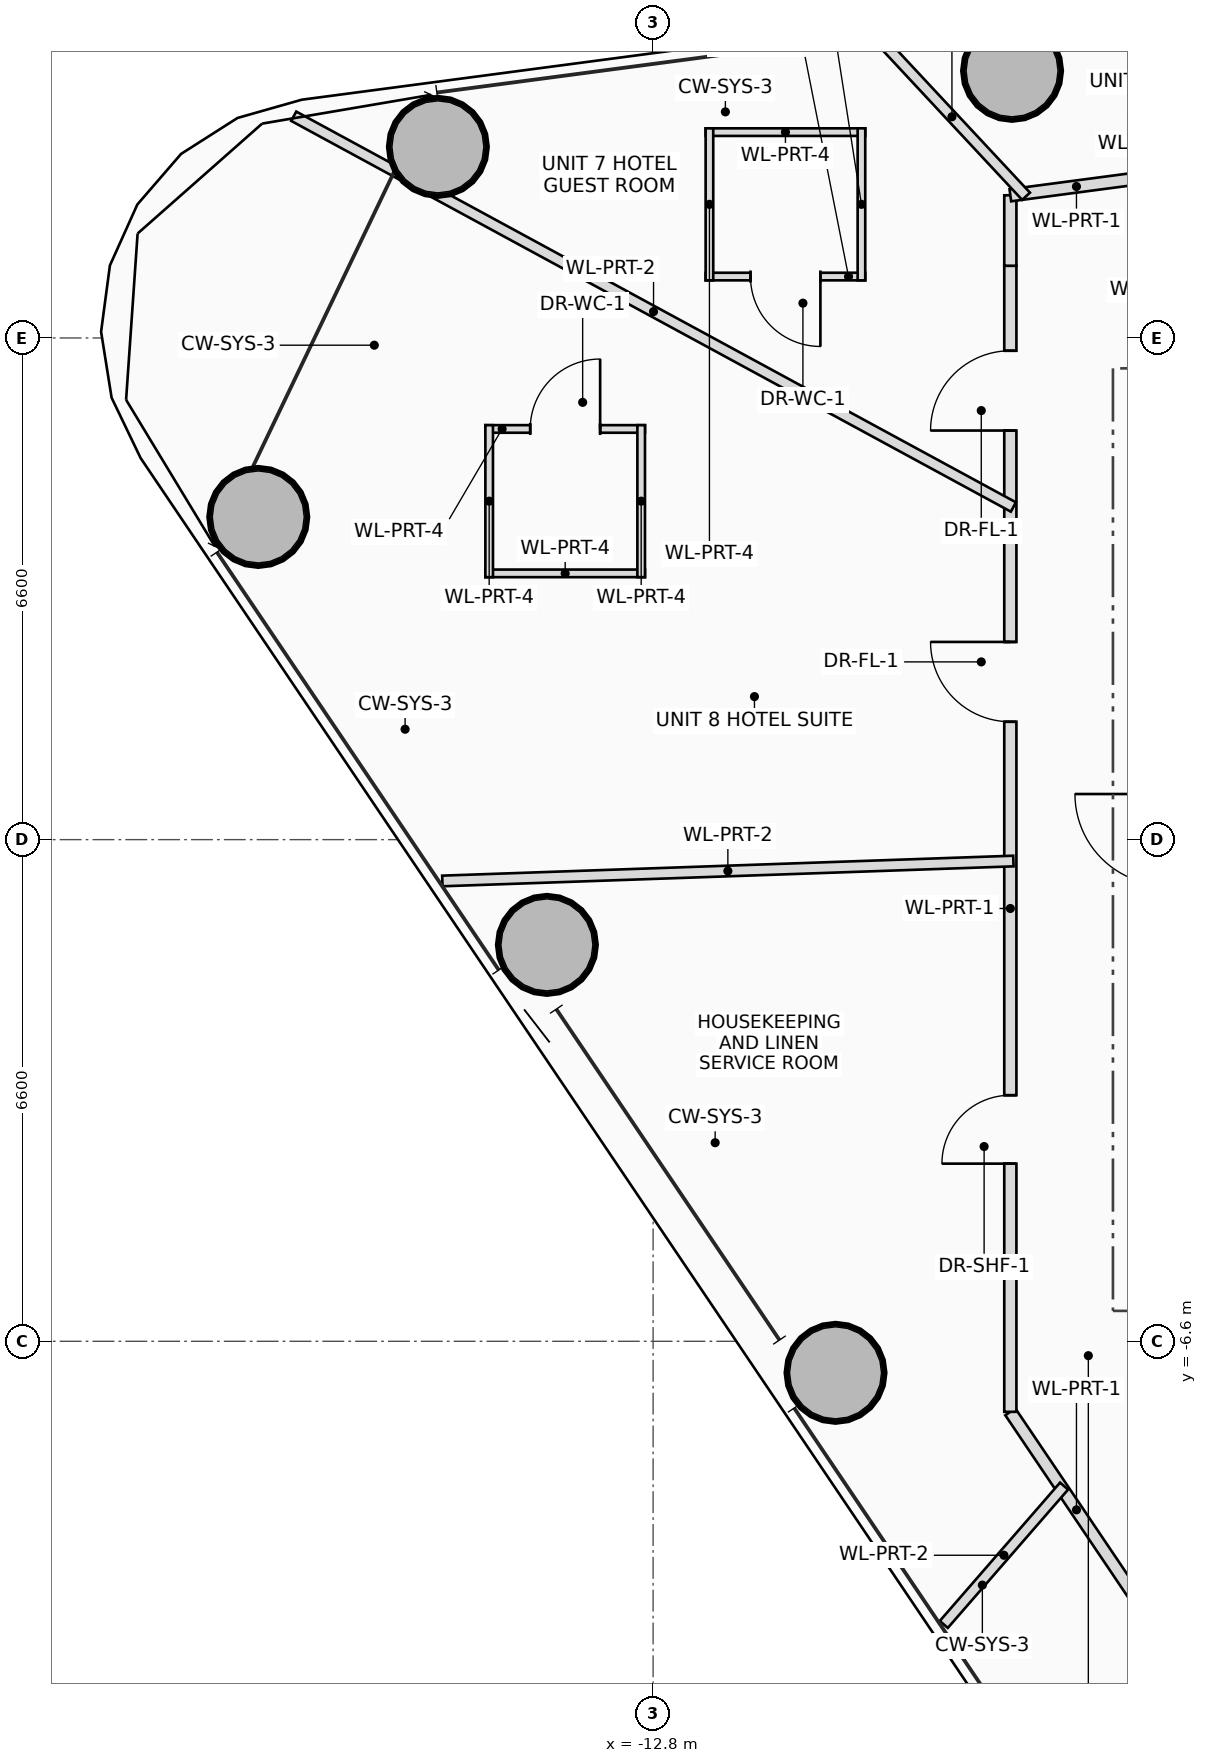
"""IFC4 building model, lengths in metres.
Left out: names, types, materials, properties, quantities, classifications, styles, units other than length and angle.
Written with IfcOpenShell. Run it as: python <this file> out.ifc"""

import sys

from ifc_helpers import new_model, si_unit, direction, frame, frame_2d, origin, origin_2d, place, context, subcontext, project, spatial, rectangle, hollow_circle, extrude, source, transform, mapped, element, fill, save


model = new_model("IFC4")
c1 = context("Model", 3, precision=1e-05, world=origin(), true_north=direction((0.0, 1.0)))
c2 = subcontext(c1, "Body", "Model", "MODEL_VIEW")
j1 = project(units=[si_unit("LENGTHUNIT", "METRE"), si_unit("PLANEANGLEUNIT", "RADIAN")], contexts=[c1])
p1 = place(None, origin())
s1 = spatial("IfcSite", under=j1, at=p1, CompositionType="ELEMENT")
p2 = place(p1, origin())
s2 = spatial("IfcBuilding", under=s1, at=p2, CompositionType="ELEMENT")
p3 = place(p2, frame((0.0, 0.0, 172.55)))
s3 = spatial("IfcBuildingStorey", under=s2, at=p3, CompositionType="ELEMENT", Elevation=172.55)
m1 = source(origin(), c2, "Body", "SweptSolid", [
    extrude(hollow_circle(Radius=0.65, WallThickness=0.045, at=origin_2d()), origin(), (0.0, 0.0, 1.0), 3.45),
])
for number, where, z_axis, x_axis in (
    (1, (-8.077, 10.114, 0.0), (0.0, 0.0, 1.0), (1.0, 0.0, 0.0)),
    (2, (-15.632, 9.114, 0.0), (0.0, 0.0, 1.0), (1.0, 0.0, 0.0)),
    (3, (-17.995, 4.245, 0.0), (0.0, 0.0, 1.0), (1.0, 0.0, 0.0)),
    (4, (-14.198, -1.385, 0.0), (0.0, 0.0, 1.0), (1.0, 0.0, 0.0)),
    (5, (-10.4, -7.015, 0.0), (0.0, 0.0, 1.0), (1.0, 0.0, 0.0)),
):
    element("IfcColumn", number, at=place(p3, frame(where, z_axis=z_axis, x_axis=x_axis)), inside=s3, PredefinedType="COLUMN", context=c2, shape_type="MappedRepresentation", body=[
        mapped(m1, transform((0.0, 0.0, 0.0), scale=1.0)),
    ])
p4 = place(p3, frame((-12.109, 9.308, 0.0), z_axis=(0.0, 0.0, 1.0), x_axis=(1.0, 0.0, 0.0)))
e6 = element("IfcWall", 6, at=p4, inside=s3, PredefinedType="PARTITIONING", context=c2, shape_type="SweptSolid", body=[
    extrude(rectangle(XDim=2.1, YDim=0.1, at=frame_2d((1.05, 0.0))), origin(), (0.0, 0.0, 1.0), 3.25),
])
p5 = place(p3, frame((-10.009, 7.408, 0.0), z_axis=(0.0, 0.0, 1.0), x_axis=(-1.0, 0.0, 0.0)))
e7 = element("IfcWall", 7, at=p5, inside=s3, PredefinedType="PARTITIONING", context=c2, shape_type="SweptSolid", body=[
    extrude(rectangle(XDim=2.1, YDim=0.1, at=frame_2d((1.05, 0.0))), origin(), (0.0, 0.0, 1.0), 2.605),
])
p6 = place(p5, frame((0.59, 0.0, 0.0)))
e8 = element("IfcOpeningElement", 8, at=p6, cuts=e7, PredefinedType="OPENING", context=c2, shape_type="SweptSolid", body=[
    extrude(rectangle(XDim=0.92, YDim=2.1, at=frame_2d((0.46, 1.05))), frame((0.0, 0.06, 0.0), z_axis=(0.0, -1.0, 0.0), x_axis=(1.0, 0.0, 0.0)), (0.0, 0.0, 1.0), 0.12),
])
p7 = place(p3, frame((-10.059, 9.358, 0.0), z_axis=(0.0, 0.0, 1.0), x_axis=(0.0, -1.0, 0.0)))
e9 = element("IfcWall", 9, at=p7, inside=s3, PredefinedType="PARTITIONING", context=c2, shape_type="SweptSolid", body=[
    extrude(rectangle(XDim=2.0, YDim=0.1, at=frame_2d((1.0, 0.0))), origin(), (0.0, 0.0, 1.0), 2.805),
])
p8 = place(p3, frame((-12.059, 7.358, 0.0), z_axis=(0.0, 0.0, 1.0), x_axis=(0.0, 1.0, 0.0)))
e10 = element("IfcWall", 10, at=p8, inside=s3, PredefinedType="PARTITIONING", context=c2, shape_type="SweptSolid", body=[
    extrude(rectangle(XDim=2.0, YDim=0.1, at=frame_2d((1.0, 0.0))), origin(), (0.0, 0.0, 1.0), 2.605),
])
p9 = place(p3, frame((-15.007, 5.403, 0.0), z_axis=(0.0, 0.0, 1.0), x_axis=(1.0, 0.0, 0.0)))
e11 = element("IfcWall", 11, at=p9, inside=s3, PredefinedType="PARTITIONING", context=c2, shape_type="SweptSolid", body=[
    extrude(rectangle(XDim=2.1, YDim=0.1, at=frame_2d((1.05, 0.0))), origin(), (0.0, 0.0, 1.0), 2.905),
])
p10 = place(p9, frame((0.59, 0.0, 0.0)))
e12 = element("IfcOpeningElement", 12, at=p10, cuts=e11, PredefinedType="OPENING", context=c2, shape_type="SweptSolid", body=[
    extrude(rectangle(XDim=0.92, YDim=2.1, at=frame_2d((0.46, 1.05))), frame((0.0, 0.06, 0.0), z_axis=(0.0, -1.0, 0.0), x_axis=(1.0, 0.0, 0.0)), (0.0, 0.0, 1.0), 0.12),
])
p11 = place(p3, frame((-12.907, 3.503, 0.0), z_axis=(0.0, 0.0, 1.0), x_axis=(-1.0, 0.0, 0.0)))
e13 = element("IfcWall", 13, at=p11, inside=s3, PredefinedType="PARTITIONING", context=c2, shape_type="SweptSolid", body=[
    extrude(rectangle(XDim=2.1, YDim=0.1, at=frame_2d((1.05, 0.0))), origin(), (0.0, 0.0, 1.0), 2.905),
])
for number, where, z_axis, x_axis in (
    (14, (-12.957, 5.453, 0.0), (0.0, 0.0, 1.0), (0.0, -1.0, 0.0)),
    (15, (-14.957, 3.453, 0.0), (0.0, 0.0, 1.0), (0.0, 1.0, 0.0)),
):
    element("IfcWall", number, at=place(p3, frame(where, z_axis=z_axis, x_axis=x_axis)), inside=s3, PredefinedType="PARTITIONING", context=c2, shape_type="SweptSolid", body=[
        extrude(rectangle(XDim=2.0, YDim=0.1, at=frame_2d((1.0, 0.0))), origin(), (0.0, 0.0, 1.0), 2.605),
    ])
p12 = place(p3, frame((-6.36, -10.107, 0.0), z_axis=(0.0, 0.0, 1.0), x_axis=(-0.559200615657, 0.829032370567, 0.0)))
e16 = element("IfcWall", 16, at=p12, inside=s3, PredefinedType="PARTITIONING", context=c2, shape_type="SweptSolid", body=[
    extrude(rectangle(XDim=3.112, YDim=0.16, at=frame_2d((1.556, 0.0))), origin(), (0.0, 0.0, 1.0), 2.605),
])
p13 = place(p3, frame((-8.1, -7.528, 0.0), z_axis=(0.0, 0.0, 1.0), x_axis=(0.0, 1.0, 0.0)))
e17 = element("IfcWall", 17, at=p13, inside=s3, PredefinedType="PARTITIONING", context=c2, shape_type="SweptSolid", body=[
    extrude(rectangle(XDim=15.078, YDim=0.16, at=frame_2d((7.539, 0.0))), origin(), (0.0, 0.0, 1.0), 2.605),
])
p14 = place(p13, frame((3.265, 0.0, 0.0)))
e18 = element("IfcOpeningElement", 18, at=p14, cuts=e17, PredefinedType="OPENING", context=c2, shape_type="SweptSolid", body=[
    extrude(rectangle(XDim=0.9, YDim=2.05, at=frame_2d((0.45, 1.025))), frame((0.0, 0.09, 0.0), z_axis=(0.0, -1.0, 0.0), x_axis=(1.0, 0.0, 0.0)), (0.0, 0.0, 1.0), 0.18),
])
p15 = place(p13, frame((9.079, 0.0, 0.0)))
e19 = element("IfcOpeningElement", 19, at=p15, cuts=e17, PredefinedType="OPENING", context=c2, shape_type="SweptSolid", body=[
    extrude(rectangle(XDim=1.05, YDim=2.2, at=frame_2d((0.525, 1.1))), frame((0.0, 0.09, 0.0), z_axis=(0.0, -1.0, 0.0), x_axis=(1.0, 0.0, 0.0)), (0.0, 0.0, 1.0), 0.18),
])
p16 = place(p13, frame((12.91, 0.0, 0.0)))
e20 = element("IfcOpeningElement", 20, at=p16, cuts=e17, PredefinedType="OPENING", context=c2, shape_type="SweptSolid", body=[
    extrude(rectangle(XDim=1.05, YDim=2.2, at=frame_2d((0.525, 1.1))), frame((0.0, 0.09, 0.0), z_axis=(0.0, -1.0, 0.0), x_axis=(1.0, 0.0, 0.0)), (0.0, 0.0, 1.0), 0.18),
])
p17 = place(p3, frame((-8.1, 7.55, 0.0), z_axis=(0.0, 0.0, 1.0), x_axis=(0.0, 1.0, 0.0)))
e21 = element("IfcWall", 21, at=p17, inside=s3, PredefinedType="PARTITIONING", context=c2, shape_type="SweptSolid", body=[
    extrude(rectangle(XDim=0.927, YDim=0.16, at=frame_2d((0.463, 0.0))), origin(), (0.0, 0.0, 1.0), 2.805),
])
p18 = place(p3, frame((-8.1, 8.477, 0.0), z_axis=(0.0, 0.0, 1.0), x_axis=(0.991341723558, 0.131307224223, 0.0)))
e22 = element("IfcWall", 22, at=p18, inside=s3, PredefinedType="PARTITIONING", context=c2, shape_type="SweptSolid", body=[
    extrude(rectangle(XDim=1.755, YDim=0.16, at=frame_2d((0.877, 0.0))), origin(), (0.0, 0.0, 1.0), 2.605),
])
p19 = place(p3, frame((-7.893, 8.464, 0.0), z_axis=(0.0, 0.0, 1.0), x_axis=(-0.682011061147, 0.73134185746, 0.0)))
e23 = element("IfcWall", 23, at=p19, inside=s3, PredefinedType="PARTITIONING", context=c2, shape_type="SweptSolid", body=[
    extrude(rectangle(XDim=2.861, YDim=0.14, at=frame_2d((1.43, 0.0))), origin(), (0.0, 0.0, 1.0), 2.765),
])
p20 = place(p3, frame((-8.06, 4.376, 0.0), z_axis=(0.0, 0.0, 1.0), x_axis=(-0.878817054271, 0.477158867802, 0.0)))
e24 = element("IfcWall", 24, at=p20, inside=s3, PredefinedType="PARTITIONING", context=c2, shape_type="SweptSolid", body=[
    extrude(rectangle(XDim=10.774, YDim=0.14, at=frame_2d((5.387, 0.0))), origin(), (0.0, 0.0, 1.0), 2.605),
])
p21 = place(p3, frame((-8.06, -0.281, 0.0), z_axis=(0.0, 0.0, 1.0), x_axis=(-0.999391525522, -0.034879488461, 0.0)))
e25 = element("IfcWall", 25, at=p21, inside=s3, PredefinedType="PARTITIONING", context=c2, shape_type="SweptSolid", body=[
    extrude(rectangle(XDim=7.518, YDim=0.14, at=frame_2d((3.759, 0.0))), origin(), (0.0, 0.0, 1.0), 2.765),
])
p22 = place(p3, frame((-7.393, -8.505, 0.0), z_axis=(0.0, 0.0, 1.0), x_axis=(-0.656043394523, -0.754723170774, 0.0)))
e26 = element("IfcWall", 26, at=p22, inside=s3, PredefinedType="PARTITIONING", context=c2, shape_type="SweptSolid", body=[
    extrude(rectangle(XDim=2.412, YDim=0.14, at=frame_2d((1.206, 0.0))), origin(), (0.0, 0.0, 1.0), 2.765),
])
p23 = place(p6, origin())
e27 = element("IfcDoor", 27, at=p23, inside=s3, OperationType="SINGLE_SWING_LEFT", PredefinedType="DOOR", context=c2, shape_type="SweptSolid", body=[
    extrude(rectangle(XDim=0.92, YDim=2.1, at=frame_2d((0.46, 1.05))), frame((0.0, 0.025, 0.0), z_axis=(0.0, -1.0, 0.0), x_axis=(1.0, 0.0, 0.0)), (0.0, 0.0, 1.0), 0.05),
])
fill(e8, e27)
p24 = place(p10, origin())
e28 = element("IfcDoor", 28, at=p24, inside=s3, OperationType="SINGLE_SWING_RIGHT", PredefinedType="DOOR", context=c2, shape_type="SweptSolid", body=[
    extrude(rectangle(XDim=0.92, YDim=2.1, at=frame_2d((0.46, 1.05))), frame((0.0, 0.025, 0.0), z_axis=(0.0, -1.0, 0.0), x_axis=(1.0, 0.0, 0.0)), (0.0, 0.0, 1.0), 0.05),
])
fill(e12, e28)
p25 = place(p14, origin())
e29 = element("IfcDoor", 29, at=p25, inside=s3, OperationType="SINGLE_SWING_LEFT", PredefinedType="DOOR", context=c2, shape_type="SweptSolid", body=[
    extrude(rectangle(XDim=0.9, YDim=2.05, at=frame_2d((0.45, 1.025))), frame((0.0, 0.025, 0.0), z_axis=(0.0, -1.0, 0.0), x_axis=(1.0, 0.0, 0.0)), (0.0, 0.0, 1.0), 0.05),
])
fill(e18, e29)
p26 = place(p15, origin())
e30 = element("IfcDoor", 30, at=p26, inside=s3, OperationType="SINGLE_SWING_RIGHT", PredefinedType="DOOR", context=c2, shape_type="SweptSolid", body=[
    extrude(rectangle(XDim=1.05, YDim=2.2, at=frame_2d((0.525, 1.1))), frame((0.0, 0.025, 0.0), z_axis=(0.0, -1.0, 0.0), x_axis=(1.0, 0.0, 0.0)), (0.0, 0.0, 1.0), 0.05),
])
fill(e19, e30)
p27 = place(p16, origin())
e31 = element("IfcDoor", 31, at=p27, inside=s3, OperationType="SINGLE_SWING_LEFT", PredefinedType="DOOR", context=c2, shape_type="SweptSolid", body=[
    extrude(rectangle(XDim=1.05, YDim=2.2, at=frame_2d((0.525, 1.1))), frame((0.0, 0.025, 0.0), z_axis=(0.0, -1.0, 0.0), x_axis=(1.0, 0.0, 0.0)), (0.0, 0.0, 1.0), 0.05),
])
fill(e20, e31)
save(model, sys.argv[1])
